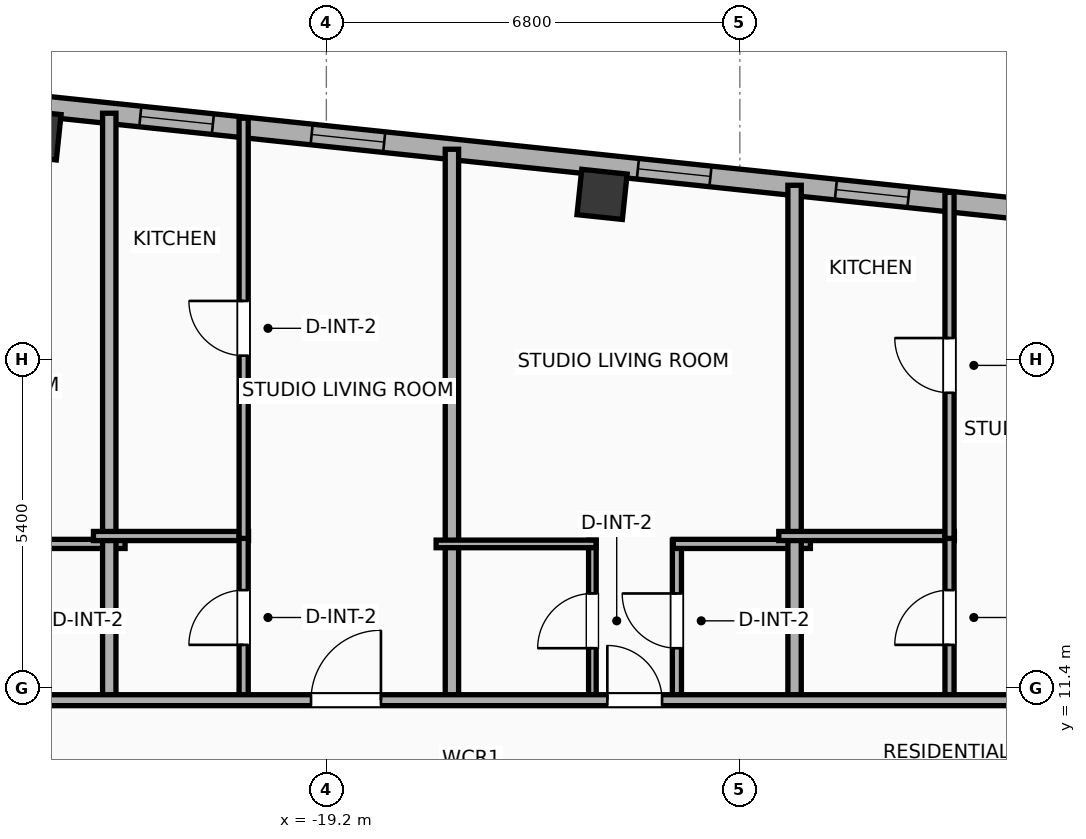
"""IFC4 building model, lengths in metres.
Left out: names, types, materials, properties, quantities, classifications, styles, units other than length and angle.
Written with IfcOpenShell. Run it as: python <this file> out.ifc"""

import sys

from ifc_helpers import new_model, si_unit, direction, frame, frame_2d, origin, origin_2d, place, context, subcontext, project, spatial, rectangle, hollow_rectangle, extrude, element, fill, save


model = new_model("IFC4")
c1 = context("Model", 3, precision=1e-05, world=origin(), true_north=direction((0.0, 1.0)))
c2 = subcontext(c1, "Body", "Model", "MODEL_VIEW")
j1 = project(units=[si_unit("LENGTHUNIT", "METRE"), si_unit("PLANEANGLEUNIT", "RADIAN")], contexts=[c1])
p1 = place(None, origin())
s1 = spatial("IfcSite", under=j1, at=p1, CompositionType="ELEMENT")
p2 = place(p1, origin())
s2 = spatial("IfcBuilding", under=s1, at=p2, CompositionType="ELEMENT")
p3 = place(p2, frame((0.0, 0.0, 287.3)))
s3 = spatial("IfcBuildingStorey", under=s2, at=p3, CompositionType="ELEMENT", Elevation=287.3)
for number, where, z_axis, x_axis in (
    (1, (-14.666, 19.518, 0.0), (0.0, 0.0, 1.0), (0.995, -0.105, 0.0)),
    (2, (-23.975, 20.497, 0.0), (0.0, 0.0, 1.0), (0.995, -0.105, 0.0)),
):
    element("IfcColumn", number, at=place(p3, frame(where, z_axis=z_axis, x_axis=x_axis)), inside=s3, PredefinedType="COLUMN", context=c2, shape_type="SweptSolid", body=[
        extrude(hollow_rectangle(XDim=0.75, YDim=0.75, WallThickness=0.025, at=origin_2d()), origin(), (0.0, 0.0, 1.0), 3.9),
    ])
p4 = place(p3, frame((-23.908, 20.972, 0.0), z_axis=(0.0, 0.0, 1.0), x_axis=(0.994521888554, -0.104528528102, 0.0)))
e3 = element("IfcWall", 3, at=p4, inside=s3, PredefinedType="ELEMENTEDWALL", context=c2, shape_type="SweptSolid", body=[
    extrude(rectangle(XDim=46.766, YDim=0.34, at=frame_2d((23.383, 0.0))), origin(), (0.0, 0.0, 1.0), 3.635),
])
p5 = place(p4, frame((22.183, 0.0, 0.75)))
e4 = element("IfcOpeningElement", 4, at=p5, cuts=e3, PredefinedType="OPENING", context=c2, shape_type="SweptSolid", body=[
    extrude(rectangle(XDim=2.4, YDim=2.1, at=frame_2d((1.2, 1.05))), frame((0.0, 0.18, 0.0), z_axis=(0.0, -1.0, 0.0), x_axis=(1.0, 0.0, 0.0)), (0.0, 0.0, 1.0), 0.36),
])
p6 = place(p4, frame((4.49, 0.0, 0.75)))
e5 = element("IfcOpeningElement", 5, at=p6, cuts=e3, PredefinedType="OPENING", context=c2, shape_type="SweptSolid", body=[
    extrude(rectangle(XDim=1.2, YDim=2.05, at=frame_2d((0.6, 1.025))), frame((0.0, 0.18, 0.0), z_axis=(0.0, -1.0, 0.0), x_axis=(1.0, 0.0, 0.0)), (0.0, 0.0, 1.0), 0.36),
])
p7 = place(p4, frame((1.657, 0.0, 0.75)))
e6 = element("IfcOpeningElement", 6, at=p7, cuts=e3, PredefinedType="OPENING", context=c2, shape_type="SweptSolid", body=[
    extrude(rectangle(XDim=1.2, YDim=2.05, at=frame_2d((0.6, 1.025))), frame((0.0, 0.18, 0.0), z_axis=(0.0, -1.0, 0.0), x_axis=(1.0, 0.0, 0.0)), (0.0, 0.0, 1.0), 0.36),
])
p8 = place(p4, frame((9.885, 0.0, 0.75)))
e7 = element("IfcOpeningElement", 7, at=p8, cuts=e3, PredefinedType="OPENING", context=c2, shape_type="SweptSolid", body=[
    extrude(rectangle(XDim=1.2, YDim=2.05, at=frame_2d((0.6, 1.025))), frame((0.0, 0.18, 0.0), z_axis=(0.0, -1.0, 0.0), x_axis=(1.0, 0.0, 0.0)), (0.0, 0.0, 1.0), 0.36),
])
p9 = place(p4, frame((16.427, 0.0, 0.75)))
e8 = element("IfcOpeningElement", 8, at=p9, cuts=e3, PredefinedType="OPENING", context=c2, shape_type="SweptSolid", body=[
    extrude(rectangle(XDim=1.2, YDim=2.05, at=frame_2d((0.6, 1.025))), frame((0.0, 0.18, 0.0), z_axis=(0.0, -1.0, 0.0), x_axis=(1.0, 0.0, 0.0)), (0.0, 0.0, 1.0), 0.36),
])
p10 = place(p4, frame((13.159, 0.0, 0.75)))
e9 = element("IfcOpeningElement", 9, at=p10, cuts=e3, PredefinedType="OPENING", context=c2, shape_type="SweptSolid", body=[
    extrude(rectangle(XDim=1.2, YDim=2.05, at=frame_2d((0.6, 1.025))), frame((0.0, 0.18, 0.0), z_axis=(0.0, -1.0, 0.0), x_axis=(1.0, 0.0, 0.0)), (0.0, 0.0, 1.0), 0.36),
])
p11 = place(p4, frame((19.586, 0.0, 0.75)))
e10 = element("IfcOpeningElement", 10, at=p11, cuts=e3, PredefinedType="OPENING", context=c2, shape_type="SweptSolid", body=[
    extrude(rectangle(XDim=1.2, YDim=2.05, at=frame_2d((0.6, 1.025))), frame((0.0, 0.18, 0.0), z_axis=(0.0, -1.0, 0.0), x_axis=(1.0, 0.0, 0.0)), (0.0, 0.0, 1.0), 0.36),
])
p12 = place(p4, frame((28.687, 0.0, 0.75)))
e11 = element("IfcOpeningElement", 11, at=p12, cuts=e3, PredefinedType="OPENING", context=c2, shape_type="SweptSolid", body=[
    extrude(rectangle(XDim=1.2, YDim=2.05, at=frame_2d((0.6, 1.025))), frame((0.0, 0.18, 0.0), z_axis=(0.0, -1.0, 0.0), x_axis=(1.0, 0.0, 0.0)), (0.0, 0.0, 1.0), 0.36),
])
p13 = place(p4, frame((34.0, 0.0, 0.75)))
e12 = element("IfcOpeningElement", 12, at=p13, cuts=e3, PredefinedType="OPENING", context=c2, shape_type="SweptSolid", body=[
    extrude(rectangle(XDim=1.2, YDim=2.05, at=frame_2d((0.6, 1.025))), frame((0.0, 0.18, 0.0), z_axis=(0.0, -1.0, 0.0), x_axis=(1.0, 0.0, 0.0)), (0.0, 0.0, 1.0), 0.36),
])
p14 = place(p4, frame((38.775, 0.0, 0.75)))
e13 = element("IfcOpeningElement", 13, at=p14, cuts=e3, PredefinedType="OPENING", context=c2, shape_type="SweptSolid", body=[
    extrude(rectangle(XDim=1.2, YDim=2.05, at=frame_2d((0.6, 1.025))), frame((0.0, 0.18, 0.0), z_axis=(0.0, -1.0, 0.0), x_axis=(1.0, 0.0, 0.0)), (0.0, 0.0, 1.0), 0.36),
])
p15 = place(p4, frame((41.836, 0.0, 0.75)))
e14 = element("IfcOpeningElement", 14, at=p15, cuts=e3, PredefinedType="OPENING", context=c2, shape_type="SweptSolid", body=[
    extrude(rectangle(XDim=1.2, YDim=2.05, at=frame_2d((0.6, 1.025))), frame((0.0, 0.18, 0.0), z_axis=(0.0, -1.0, 0.0), x_axis=(1.0, 0.0, 0.0)), (0.0, 0.0, 1.0), 0.36),
])
p16 = place(p4, frame((44.206, 0.0, 0.75)))
e15 = element("IfcOpeningElement", 15, at=p16, cuts=e3, PredefinedType="OPENING", context=c2, shape_type="SweptSolid", body=[
    extrude(rectangle(XDim=1.2, YDim=2.05, at=frame_2d((0.6, 1.025))), frame((0.0, 0.18, 0.0), z_axis=(0.0, -1.0, 0.0), x_axis=(1.0, 0.0, 0.0)), (0.0, 0.0, 1.0), 0.36),
])
p17 = place(p3, frame((-24.786, 13.77, 0.0), z_axis=(0.0, 0.0, 1.0), x_axis=(1.0, 0.0, 0.0)))
e16 = element("IfcWall", 16, at=p17, inside=s3, PredefinedType="PLUMBINGWALL", context=c2, shape_type="SweptSolid", body=[
    extrude(rectangle(XDim=2.276, YDim=0.15, at=frame_2d((1.138, 0.0))), origin(), (0.0, 0.0, 1.0), 3.635),
])
p18 = place(p3, frame((-22.77, 11.12, 0.0), z_axis=(0.0, 0.0, 1.0), x_axis=(0.0, 1.0, 0.0)))
e17 = element("IfcWall", 17, at=p18, inside=s3, PredefinedType="PARTITIONING", context=c2, shape_type="SweptSolid", body=[
    extrude(rectangle(XDim=9.732, YDim=0.22, at=frame_2d((4.866, 0.0))), origin(), (0.0, 0.0, 1.0), 3.075),
])
p19 = place(p3, frame((-23.03, 13.9, 0.0), z_axis=(0.0, 0.0, 1.0), x_axis=(1.0, 0.0, 0.0)))
e18 = element("IfcWall", 18, at=p19, inside=s3, PredefinedType="PLUMBINGWALL", context=c2, shape_type="SweptSolid", body=[
    extrude(rectangle(XDim=2.55, YDim=0.15, at=frame_2d((1.275, 0.0))), origin(), (0.0, 0.0, 1.0), 3.635),
])
p20 = place(p3, frame((-20.56, 11.18, 0.0), z_axis=(0.0, 0.0, 1.0), x_axis=(0.0, 1.0, 0.0)))
e19 = element("IfcWall", 19, at=p20, inside=s3, PredefinedType="PLUMBINGWALL", context=c2, shape_type="SweptSolid", body=[
    extrude(rectangle(XDim=2.76, YDim=0.15, at=frame_2d((1.38, 0.0))), origin(), (0.0, 0.0, 1.0), 3.075),
])
p21 = place(p20, frame((0.93, 0.0, 0.0)))
e20 = element("IfcOpeningElement", 20, at=p21, cuts=e19, PredefinedType="OPENING", context=c2, shape_type="SweptSolid", body=[
    extrude(rectangle(XDim=0.9, YDim=2.05, at=frame_2d((0.45, 1.025))), frame((0.0, 0.085, 0.0), z_axis=(0.0, -1.0, 0.0), x_axis=(1.0, 0.0, 0.0)), (0.0, 0.0, 1.0), 0.17),
])
p22 = place(p3, frame((-20.56, 13.86, 0.0), z_axis=(0.0, 0.0, 1.0), x_axis=(0.0, 1.0, 0.0)))
e21 = element("IfcWall", 21, at=p22, inside=s3, PredefinedType="PLUMBINGWALL", context=c2, shape_type="SweptSolid", body=[
    extrude(rectangle(XDim=6.911, YDim=0.15, at=frame_2d((3.456, 0.0))), origin(), (0.0, 0.0, 1.0), 3.635),
])
p23 = place(p22, frame((3.006, 0.0, 0.0)))
e22 = element("IfcOpeningElement", 22, at=p23, cuts=e21, PredefinedType="OPENING", context=c2, shape_type="SweptSolid", body=[
    extrude(rectangle(XDim=0.9, YDim=2.05, at=frame_2d((0.45, 1.025))), frame((0.0, 0.085, 0.0), z_axis=(0.0, -1.0, 0.0), x_axis=(1.0, 0.0, 0.0)), (0.0, 0.0, 1.0), 0.17),
])
p24 = place(p3, frame((-17.135, 11.12, 0.0), z_axis=(0.0, 0.0, 1.0), x_axis=(0.0, 1.0, 0.0)))
e23 = element("IfcWall", 23, at=p24, inside=s3, PredefinedType="PARTITIONING", context=c2, shape_type="SweptSolid", body=[
    extrude(rectangle(XDim=9.14, YDim=0.22, at=frame_2d((4.57, 0.0))), origin(), (0.0, 0.0, 1.0), 3.635),
])
p25 = place(p3, frame((-14.825, 11.18, 0.0), z_axis=(0.0, 0.0, 1.0), x_axis=(0.0, 1.0, 0.0)))
e24 = element("IfcWall", 24, at=p25, inside=s3, PredefinedType="PARTITIONING", context=c2, shape_type="SweptSolid", body=[
    extrude(rectangle(XDim=2.65, YDim=0.125, at=frame_2d((1.325, 0.0))), origin(), (0.0, 0.0, 1.0), 3.635),
])
p26 = place(p25, frame((0.875, 0.0, 0.0)))
e25 = element("IfcOpeningElement", 25, at=p26, cuts=e24, PredefinedType="OPENING", context=c2, shape_type="SweptSolid", body=[
    extrude(rectangle(XDim=0.9, YDim=2.05, at=frame_2d((0.45, 1.025))), frame((0.0, 0.073, 0.0), z_axis=(0.0, -1.0, 0.0), x_axis=(1.0, 0.0, 0.0)), (0.0, 0.0, 1.0), 0.145),
])
p27 = place(p3, frame((-13.435, 11.18, 0.0), z_axis=(0.0, 0.0, 1.0), x_axis=(0.0, 1.0, 0.0)))
e26 = element("IfcWall", 26, at=p27, inside=s3, PredefinedType="PLUMBINGWALL", context=c2, shape_type="SweptSolid", body=[
    extrude(rectangle(XDim=2.65, YDim=0.15, at=frame_2d((1.325, 0.0))), origin(), (0.0, 0.0, 1.0), 3.635),
])
p28 = place(p27, frame((0.875, 0.0, 0.0)))
e27 = element("IfcOpeningElement", 27, at=p28, cuts=e26, PredefinedType="OPENING", context=c2, shape_type="SweptSolid", body=[
    extrude(rectangle(XDim=0.9, YDim=2.05, at=frame_2d((0.45, 1.025))), frame((0.0, 0.085, 0.0), z_axis=(0.0, -1.0, 0.0), x_axis=(1.0, 0.0, 0.0)), (0.0, 0.0, 1.0), 0.17),
])
p29 = place(p3, frame((-17.395, 13.77, 0.0), z_axis=(0.0, 0.0, 1.0), x_axis=(1.0, 0.0, 0.0)))
e28 = element("IfcWall", 28, at=p29, inside=s3, PredefinedType="PARTITIONING", context=c2, shape_type="SweptSolid", body=[
    extrude(rectangle(XDim=2.63, YDim=0.125, at=frame_2d((1.315, 0.0))), origin(), (0.0, 0.0, 1.0), 3.635),
])
p30 = place(p3, frame((-13.495, 13.77, 0.0), z_axis=(0.0, 0.0, 1.0), x_axis=(1.0, 0.0, 0.0)))
e29 = element("IfcWall", 29, at=p30, inside=s3, PredefinedType="PLUMBINGWALL", context=c2, shape_type="SweptSolid", body=[
    extrude(rectangle(XDim=2.255, YDim=0.15, at=frame_2d((1.127, 0.0))), origin(), (0.0, 0.0, 1.0), 3.635),
])
p31 = place(p3, frame((-11.5, 11.12, 0.0), z_axis=(0.0, 0.0, 1.0), x_axis=(0.0, 1.0, 0.0)))
e30 = element("IfcWall", 30, at=p31, inside=s3, PredefinedType="PARTITIONING", context=c2, shape_type="SweptSolid", body=[
    extrude(rectangle(XDim=8.548, YDim=0.22, at=frame_2d((4.274, 0.0))), origin(), (0.0, 0.0, 1.0), 3.635),
])
p32 = place(p3, frame((-11.76, 13.9, 0.0), z_axis=(0.0, 0.0, 1.0), x_axis=(1.0, 0.0, 0.0)))
e31 = element("IfcWall", 31, at=p32, inside=s3, PredefinedType="PLUMBINGWALL", context=c2, shape_type="SweptSolid", body=[
    extrude(rectangle(XDim=2.888, YDim=0.15, at=frame_2d((1.444, 0.0))), origin(), (0.0, 0.0, 1.0), 3.635),
])
p33 = place(p3, frame((-8.952, 11.18, 0.0), z_axis=(0.0, 0.0, 1.0), x_axis=(0.0, 1.0, 0.0)))
e32 = element("IfcWall", 32, at=p33, inside=s3, PredefinedType="PLUMBINGWALL", context=c2, shape_type="SweptSolid", body=[
    extrude(rectangle(XDim=2.76, YDim=0.15, at=frame_2d((1.38, 0.0))), origin(), (0.0, 0.0, 1.0), 3.635),
])
p34 = place(p33, frame((0.93, 0.0, 0.0)))
e33 = element("IfcOpeningElement", 33, at=p34, cuts=e32, PredefinedType="OPENING", context=c2, shape_type="SweptSolid", body=[
    extrude(rectangle(XDim=0.9, YDim=2.05, at=frame_2d((0.45, 1.025))), frame((0.0, 0.085, 0.0), z_axis=(0.0, -1.0, 0.0), x_axis=(1.0, 0.0, 0.0)), (0.0, 0.0, 1.0), 0.17),
])
p35 = place(p3, frame((-8.952, 13.86, 0.0), z_axis=(0.0, 0.0, 1.0), x_axis=(0.0, 1.0, 0.0)))
e34 = element("IfcWall", 34, at=p35, inside=s3, PredefinedType="PLUMBINGWALL", context=c2, shape_type="SweptSolid", body=[
    extrude(rectangle(XDim=5.691, YDim=0.15, at=frame_2d((2.845, 0.0))), origin(), (0.0, 0.0, 1.0), 3.635),
])
p36 = place(p35, frame((2.396, 0.0, 0.0)))
e35 = element("IfcOpeningElement", 35, at=p36, cuts=e34, PredefinedType="OPENING", context=c2, shape_type="SweptSolid", body=[
    extrude(rectangle(XDim=0.9, YDim=2.05, at=frame_2d((0.45, 1.025))), frame((0.0, 0.085, 0.0), z_axis=(0.0, -1.0, 0.0), x_axis=(1.0, 0.0, 0.0)), (0.0, 0.0, 1.0), 0.17),
])
p37 = place(p3, frame((-28.401, 11.2, 0.0), z_axis=(0.0, 0.0, 1.0), x_axis=(1.0, 0.0, 0.0)))
e36 = element("IfcWall", 36, at=p37, inside=s3, PredefinedType="PARTITIONING", context=c2, shape_type="SweptSolid", body=[
    extrude(rectangle(XDim=53.956, YDim=0.18, at=frame_2d((26.978, 0.0))), origin(), (0.0, 0.0, 1.0), 3.635),
])
p38 = place(p37, frame((2.512, 0.0, 0.0)))
e37 = element("IfcOpeningElement", 37, at=p38, cuts=e36, PredefinedType="OPENING", context=c2, shape_type="SweptSolid", body=[
    extrude(rectangle(XDim=0.9, YDim=2.05, at=frame_2d((0.45, 1.025))), frame((0.0, 0.1, 0.0), z_axis=(0.0, -1.0, 0.0), x_axis=(1.0, 0.0, 0.0)), (0.0, 0.0, 1.0), 0.2),
])
p39 = place(p37, frame((8.948, 0.0, 0.0)))
e38 = element("IfcOpeningElement", 38, at=p39, cuts=e36, PredefinedType="OPENING", context=c2, shape_type="SweptSolid", body=[
    extrude(rectangle(XDim=1.15, YDim=2.05, at=frame_2d((0.575, 1.025))), frame((0.0, 0.1, 0.0), z_axis=(0.0, -1.0, 0.0), x_axis=(1.0, 0.0, 0.0)), (0.0, 0.0, 1.0), 0.2),
])
p40 = place(p37, frame((13.821, 0.0, 0.0)))
e39 = element("IfcOpeningElement", 39, at=p40, cuts=e36, PredefinedType="OPENING", context=c2, shape_type="SweptSolid", body=[
    extrude(rectangle(XDim=0.9, YDim=2.05, at=frame_2d((0.45, 1.025))), frame((0.0, 0.1, 0.0), z_axis=(0.0, -1.0, 0.0), x_axis=(1.0, 0.0, 0.0)), (0.0, 0.0, 1.0), 0.2),
])
p41 = place(p37, frame((20.818, 0.0, 0.0)))
e40 = element("IfcOpeningElement", 40, at=p41, cuts=e36, PredefinedType="OPENING", context=c2, shape_type="SweptSolid", body=[
    extrude(rectangle(XDim=1.15, YDim=2.05, at=frame_2d((0.575, 1.025))), frame((0.0, 0.1, 0.0), z_axis=(0.0, -1.0, 0.0), x_axis=(1.0, 0.0, 0.0)), (0.0, 0.0, 1.0), 0.2),
])
p42 = place(p37, frame((27.212, 0.0, 0.0)))
e41 = element("IfcOpeningElement", 41, at=p42, cuts=e36, PredefinedType="OPENING", context=c2, shape_type="SweptSolid", body=[
    extrude(rectangle(XDim=1.15, YDim=2.05, at=frame_2d((0.575, 1.025))), frame((0.0, 0.1, 0.0), z_axis=(0.0, -1.0, 0.0), x_axis=(1.0, 0.0, 0.0)), (0.0, 0.0, 1.0), 0.2),
])
p43 = place(p37, frame((32.576, 0.0, 0.0)))
e42 = element("IfcOpeningElement", 42, at=p43, cuts=e36, PredefinedType="OPENING", context=c2, shape_type="SweptSolid", body=[
    extrude(rectangle(XDim=0.9, YDim=2.05, at=frame_2d((0.45, 1.025))), frame((0.0, 0.1, 0.0), z_axis=(0.0, -1.0, 0.0), x_axis=(1.0, 0.0, 0.0)), (0.0, 0.0, 1.0), 0.2),
])
p44 = place(p37, frame((38.576, 0.0, 0.0)))
e43 = element("IfcOpeningElement", 43, at=p44, cuts=e36, PredefinedType="OPENING", context=c2, shape_type="SweptSolid", body=[
    extrude(rectangle(XDim=0.9, YDim=2.05, at=frame_2d((0.45, 1.025))), frame((0.0, 0.1, 0.0), z_axis=(0.0, -1.0, 0.0), x_axis=(1.0, 0.0, 0.0)), (0.0, 0.0, 1.0), 0.2),
])
p45 = place(p37, frame((43.102, 0.0, 0.0)))
e44 = element("IfcOpeningElement", 44, at=p45, cuts=e36, PredefinedType="OPENING", context=c2, shape_type="SweptSolid", body=[
    extrude(rectangle(XDim=1.15, YDim=2.05, at=frame_2d((0.575, 1.025))), frame((0.0, 0.1, 0.0), z_axis=(0.0, -1.0, 0.0), x_axis=(1.0, 0.0, 0.0)), (0.0, 0.0, 1.0), 0.2),
])
p46 = place(p37, frame((50.732, 0.0, 0.0)))
e45 = element("IfcOpeningElement", 45, at=p46, cuts=e36, PredefinedType="OPENING", context=c2, shape_type="SweptSolid", body=[
    extrude(rectangle(XDim=0.9, YDim=2.05, at=frame_2d((0.45, 1.025))), frame((0.0, 0.1, 0.0), z_axis=(0.0, -1.0, 0.0), x_axis=(1.0, 0.0, 0.0)), (0.0, 0.0, 1.0), 0.2),
])
p47 = place(p6, origin())
e46 = element("IfcWindow", 46, at=p47, inside=s3, PartitioningType="SINGLE_PANEL", PredefinedType="WINDOW", context=c2, shape_type="SweptSolid", body=[
    extrude(rectangle(XDim=1.2, YDim=2.05, at=frame_2d((0.6, 1.025))), frame((0.0, 0.03, 0.0), z_axis=(0.0, -1.0, 0.0), x_axis=(1.0, 0.0, 0.0)), (0.0, 0.0, 1.0), 0.06),
])
fill(e5, e46)
p48 = place(p7, origin())
e47 = element("IfcWindow", 47, at=p48, inside=s3, PartitioningType="SINGLE_PANEL", PredefinedType="WINDOW", context=c2, shape_type="SweptSolid", body=[
    extrude(rectangle(XDim=1.2, YDim=2.05, at=frame_2d((0.6, 1.025))), frame((0.0, 0.03, 0.0), z_axis=(0.0, -1.0, 0.0), x_axis=(1.0, 0.0, 0.0)), (0.0, 0.0, 1.0), 0.06),
])
fill(e6, e47)
p49 = place(p8, origin())
e48 = element("IfcWindow", 48, at=p49, inside=s3, PartitioningType="SINGLE_PANEL", PredefinedType="WINDOW", context=c2, shape_type="SweptSolid", body=[
    extrude(rectangle(XDim=1.2, YDim=2.05, at=frame_2d((0.6, 1.025))), frame((0.0, 0.03, 0.0), z_axis=(0.0, -1.0, 0.0), x_axis=(1.0, 0.0, 0.0)), (0.0, 0.0, 1.0), 0.06),
])
fill(e7, e48)
p50 = place(p10, origin())
e49 = element("IfcWindow", 49, at=p50, inside=s3, PartitioningType="SINGLE_PANEL", PredefinedType="WINDOW", context=c2, shape_type="SweptSolid", body=[
    extrude(rectangle(XDim=1.2, YDim=2.05, at=frame_2d((0.6, 1.025))), frame((0.0, 0.03, 0.0), z_axis=(0.0, -1.0, 0.0), x_axis=(1.0, 0.0, 0.0)), (0.0, 0.0, 1.0), 0.06),
])
fill(e9, e49)
p51 = place(p21, origin())
e50 = element("IfcDoor", 50, at=p51, inside=s3, OperationType="SINGLE_SWING_LEFT", PredefinedType="DOOR", context=c2, shape_type="SweptSolid", body=[
    extrude(rectangle(XDim=0.9, YDim=2.05, at=frame_2d((0.45, 1.025))), frame((0.0, 0.025, 0.0), z_axis=(0.0, -1.0, 0.0), x_axis=(1.0, 0.0, 0.0)), (0.0, 0.0, 1.0), 0.05),
])
fill(e20, e50)
p52 = place(p23, origin())
e51 = element("IfcDoor", 51, at=p52, inside=s3, OperationType="SINGLE_SWING_RIGHT", PredefinedType="DOOR", context=c2, shape_type="SweptSolid", body=[
    extrude(rectangle(XDim=0.9, YDim=2.05, at=frame_2d((0.45, 1.025))), frame((0.0, 0.025, 0.0), z_axis=(0.0, -1.0, 0.0), x_axis=(1.0, 0.0, 0.0)), (0.0, 0.0, 1.0), 0.05),
])
fill(e22, e51)
p53 = place(p26, origin())
e52 = element("IfcDoor", 52, at=p53, inside=s3, OperationType="SINGLE_SWING_LEFT", PredefinedType="DOOR", context=c2, shape_type="SweptSolid", body=[
    extrude(rectangle(XDim=0.9, YDim=2.05, at=frame_2d((0.45, 1.025))), frame((0.0, 0.025, 0.0), z_axis=(0.0, -1.0, 0.0), x_axis=(1.0, 0.0, 0.0)), (0.0, 0.0, 1.0), 0.05),
])
fill(e25, e52)
p54 = place(p28, origin())
e53 = element("IfcDoor", 53, at=p54, inside=s3, OperationType="SINGLE_SWING_RIGHT", PredefinedType="DOOR", context=c2, shape_type="SweptSolid", body=[
    extrude(rectangle(XDim=0.9, YDim=2.05, at=frame_2d((0.45, 1.025))), frame((0.0, 0.025, 0.0), z_axis=(0.0, -1.0, 0.0), x_axis=(1.0, 0.0, 0.0)), (0.0, 0.0, 1.0), 0.05),
])
fill(e27, e53)
p55 = place(p34, origin())
e54 = element("IfcDoor", 54, at=p55, inside=s3, OperationType="SINGLE_SWING_LEFT", PredefinedType="DOOR", context=c2, shape_type="SweptSolid", body=[
    extrude(rectangle(XDim=0.9, YDim=2.05, at=frame_2d((0.45, 1.025))), frame((0.0, 0.025, 0.0), z_axis=(0.0, -1.0, 0.0), x_axis=(1.0, 0.0, 0.0)), (0.0, 0.0, 1.0), 0.05),
])
fill(e33, e54)
p56 = place(p36, origin())
e55 = element("IfcDoor", 55, at=p56, inside=s3, OperationType="SINGLE_SWING_RIGHT", PredefinedType="DOOR", context=c2, shape_type="SweptSolid", body=[
    extrude(rectangle(XDim=0.9, YDim=2.05, at=frame_2d((0.45, 1.025))), frame((0.0, 0.025, 0.0), z_axis=(0.0, -1.0, 0.0), x_axis=(1.0, 0.0, 0.0)), (0.0, 0.0, 1.0), 0.05),
])
fill(e35, e55)
p57 = place(p39, origin())
e56 = element("IfcDoor", 56, at=p57, inside=s3, OperationType="SINGLE_SWING_RIGHT", PredefinedType="DOOR", context=c2, shape_type="SweptSolid", body=[
    extrude(rectangle(XDim=1.15, YDim=2.05, at=frame_2d((0.575, 1.025))), frame((0.0, 0.025, 0.0), z_axis=(0.0, -1.0, 0.0), x_axis=(1.0, 0.0, 0.0)), (0.0, 0.0, 1.0), 0.05),
])
fill(e38, e56)
p58 = place(p40, origin())
e57 = element("IfcDoor", 57, at=p58, inside=s3, OperationType="SINGLE_SWING_LEFT", PredefinedType="DOOR", context=c2, shape_type="SweptSolid", body=[
    extrude(rectangle(XDim=0.9, YDim=2.05, at=frame_2d((0.45, 1.025))), frame((0.0, 0.025, 0.0), z_axis=(0.0, -1.0, 0.0), x_axis=(1.0, 0.0, 0.0)), (0.0, 0.0, 1.0), 0.05),
])
fill(e39, e57)
save(model, sys.argv[1])
